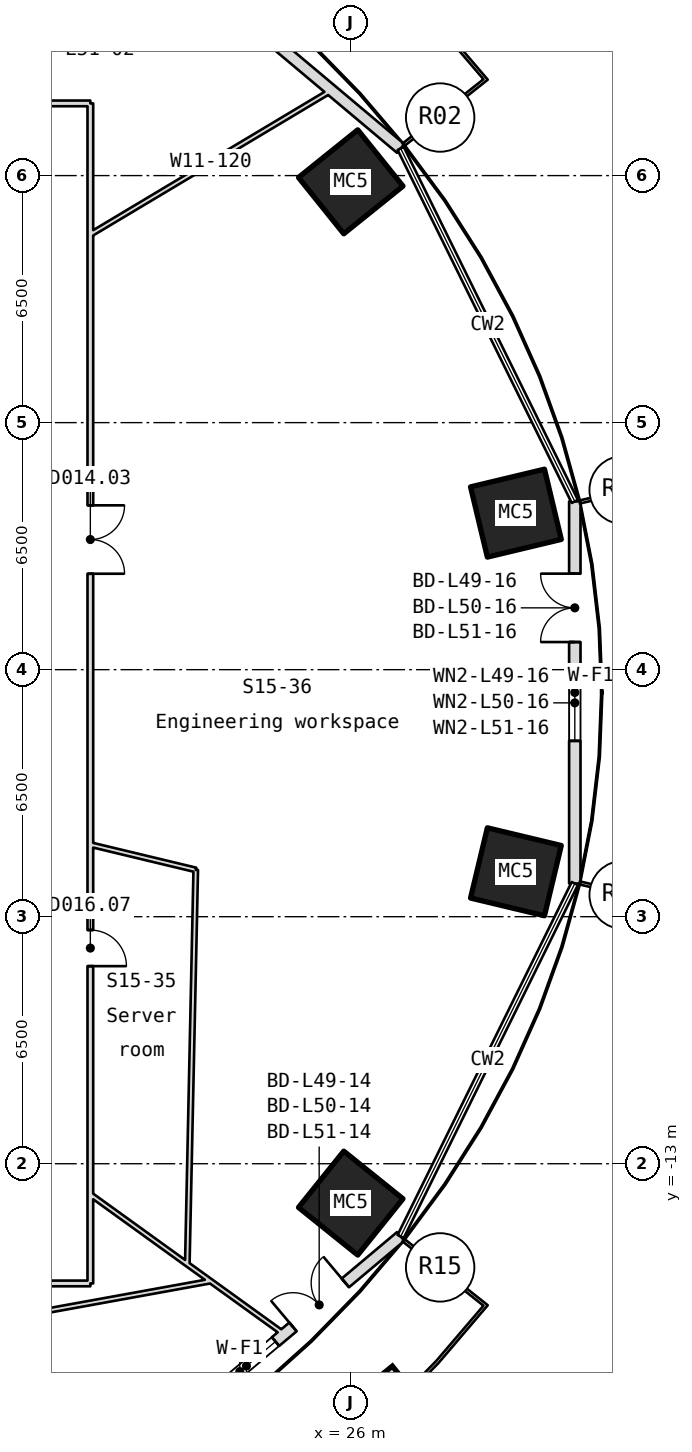
"""IFC4 building model, lengths in metres.
Left out: names, types, materials, properties, quantities, classifications, styles, units other than length and angle.
Written with IfcOpenShell. Run it as: python <this file> out.ifc"""

import sys

from ifc_helpers import new_model, si_unit, direction, frame, frame_2d, origin, origin_2d, place, context, subcontext, project, spatial, rectangle, hollow_rectangle, extrude, element, fill, save


model = new_model("IFC4")
c1 = context("Model", 3, precision=1e-05, world=origin(), true_north=direction((0.0, 1.0)))
c2 = subcontext(c1, "Body", "Model", "MODEL_VIEW")
j1 = project(units=[si_unit("LENGTHUNIT", "METRE"), si_unit("PLANEANGLEUNIT", "RADIAN")], contexts=[c1])
p1 = place(None, origin())
s1 = spatial("IfcSite", under=j1, at=p1, CompositionType="ELEMENT")
p2 = place(p1, origin())
s2 = spatial("IfcBuilding", under=s1, at=p2, CompositionType="ELEMENT")
p3 = place(p2, frame((0.0, 0.0, 223.3)))
s3 = spatial("IfcBuildingStorey", under=s2, at=p3, CompositionType="ELEMENT", Elevation=223.3)
for number, where, z_axis, x_axis in (
    (1, (30.349, 4.118, -0.18), (0.0, 0.0, 1.0), (0.233, -0.973, 0.0)),
    (2, (26.002, 12.836, -0.18), (0.0, 0.0, 1.0), (0.627, -0.779, 0.0)),
    (3, (26.002, -14.037, -0.18), (0.0, 0.0, 1.0), (-0.627, -0.779, 0.0)),
    (4, (30.349, -5.318, -0.18), (0.0, 0.0, 1.0), (-0.233, -0.973, 0.0)),
):
    element("IfcColumn", number, at=place(p3, frame(where, z_axis=z_axis, x_axis=x_axis)), inside=s3, PredefinedType="COLUMN", context=c2, shape_type="SweptSolid", body=[
        extrude(hollow_rectangle(XDim=1.9, YDim=2.0, WallThickness=0.07, at=origin_2d()), origin(), (0.0, 0.0, 1.0), 4.15),
    ])
p4 = place(p3, frame((27.316, 13.714, 0.0), z_axis=(0.0, 0.0, 1.0), x_axis=(-0.765870158107, 0.642995257308, 0.0)))
e5 = element("IfcWall", 5, at=p4, inside=s3, PredefinedType="SOLIDWALL", context=c2, shape_type="SweptSolid", body=[
    extrude(rectangle(XDim=11.055, YDim=0.3, at=frame_2d((5.528, 0.0))), origin(), (0.0, 0.0, 1.0), 3.97),
])
p5 = place(p4, frame((7.355, 0.0, 0.0)))
e6 = element("IfcOpeningElement", 6, at=p5, cuts=e5, PredefinedType="OPENING", context=c2, shape_type="SweptSolid", body=[
    extrude(rectangle(XDim=1.8, YDim=2.4, at=frame_2d((0.9, 1.2))), frame((0.0, 0.16, 0.0), z_axis=(0.0, -1.0, 0.0), x_axis=(1.0, 0.0, 0.0)), (0.0, 0.0, 1.0), 0.32),
])
p6 = place(p4, frame((4.755, 0.0, 0.9)))
e7 = element("IfcOpeningElement", 7, at=p6, cuts=e5, PredefinedType="OPENING", context=c2, shape_type="SweptSolid", body=[
    extrude(rectangle(XDim=2.0, YDim=1.5, at=frame_2d((1.0, 0.75))), frame((0.0, 0.16, 0.0), z_axis=(0.0, -1.0, 0.0), x_axis=(1.0, 0.0, 0.0)), (0.0, 0.0, 1.0), 0.32),
])
p7 = place(p3, frame((18.849, -22.023, 0.0), z_axis=(0.0, 0.0, 1.0), x_axis=(0.765870158107, 0.642995257308, 0.0)))
e8 = element("IfcWall", 8, at=p7, inside=s3, PredefinedType="SOLIDWALL", context=c2, shape_type="SweptSolid", body=[
    extrude(rectangle(XDim=11.055, YDim=0.3, at=frame_2d((5.528, 0.0))), origin(), (0.0, 0.0, 1.0), 3.97),
])
p8 = place(p7, frame((7.355, 0.0, 0.0)))
e9 = element("IfcOpeningElement", 9, at=p8, cuts=e8, PredefinedType="OPENING", context=c2, shape_type="SweptSolid", body=[
    extrude(rectangle(XDim=1.8, YDim=2.4, at=frame_2d((0.9, 1.2))), frame((0.0, 0.16, 0.0), z_axis=(0.0, -1.0, 0.0), x_axis=(1.0, 0.0, 0.0)), (0.0, 0.0, 1.0), 0.32),
])
p9 = place(p7, frame((4.755, 0.0, 0.9)))
e10 = element("IfcOpeningElement", 10, at=p9, cuts=e8, PredefinedType="OPENING", context=c2, shape_type="SweptSolid", body=[
    extrude(rectangle(XDim=2.0, YDim=1.5, at=frame_2d((1.0, 0.75))), frame((0.0, 0.16, 0.0), z_axis=(0.0, -1.0, 0.0), x_axis=(1.0, 0.0, 0.0)), (0.0, 0.0, 1.0), 0.32),
])
p10 = place(p3, frame((31.898, -5.626, 0.0), z_axis=(0.0, 0.0, 1.0), x_axis=(0.0, 1.0, 0.0)))
e11 = element("IfcWall", 11, at=p10, inside=s3, PredefinedType="SOLIDWALL", context=c2, shape_type="SweptSolid", body=[
    extrude(rectangle(XDim=10.053, YDim=0.3, at=frame_2d((5.026, 0.0))), origin(), (0.0, 0.0, 1.0), 3.97),
])
p11 = place(p10, frame((6.353, 0.0, 0.0)))
e12 = element("IfcOpeningElement", 12, at=p11, cuts=e11, PredefinedType="OPENING", context=c2, shape_type="SweptSolid", body=[
    extrude(rectangle(XDim=1.8, YDim=2.4, at=frame_2d((0.9, 1.2))), frame((0.0, 0.16, 0.0), z_axis=(0.0, -1.0, 0.0), x_axis=(1.0, 0.0, 0.0)), (0.0, 0.0, 1.0), 0.32),
])
p12 = place(p10, frame((3.753, 0.0, 0.9)))
e13 = element("IfcOpeningElement", 13, at=p12, cuts=e11, PredefinedType="OPENING", context=c2, shape_type="SweptSolid", body=[
    extrude(rectangle(XDim=2.0, YDim=1.5, at=frame_2d((1.0, 0.75))), frame((0.0, 0.16, 0.0), z_axis=(0.0, -1.0, 0.0), x_axis=(1.0, 0.0, 0.0)), (0.0, 0.0, 1.0), 0.32),
])
p13 = place(p3, frame((8.066, -18.673, 0.0), z_axis=(0.0, 0.0, 1.0), x_axis=(0.983945089575, 0.178471456263, 0.0)))
e14 = element("IfcWall", 14, at=p13, inside=s3, PredefinedType="PARTITIONING", context=c2, shape_type="SweptSolid", body=[
    extrude(rectangle(XDim=14.48, YDim=0.12, at=frame_2d((7.24, 0.0))), origin(), (0.0, 0.0, 1.0), 3.97),
])
p14 = place(p3, frame((16.45, 14.9, 0.0), z_axis=(0.0, 0.0, 1.0), x_axis=(1.0, 0.0, 0.0)))
e15 = element("IfcWall", 15, at=p14, inside=s3, PredefinedType="PARTITIONING", context=c2, shape_type="SweptSolid", body=[
    extrude(rectangle(XDim=2.7, YDim=0.15, at=frame_2d((1.35, 0.0))), origin(), (0.0, 0.0, 1.0), 3.97),
])
p15 = place(p3, frame((19.15, -16.15, 0.0), z_axis=(0.0, 0.0, 1.0), x_axis=(-1.0, 0.0, 0.0)))
e16 = element("IfcWall", 16, at=p15, inside=s3, PredefinedType="PARTITIONING", context=c2, shape_type="SweptSolid", body=[
    extrude(rectangle(XDim=38.3, YDim=0.15, at=frame_2d((19.15, 0.0))), origin(), (0.0, 0.0, 1.0), 3.97),
])
p16 = place(p15, frame((5.611, 0.0, 0.0)))
e17 = element("IfcOpeningElement", 17, at=p16, cuts=e16, PredefinedType="OPENING", context=c2, shape_type="SweptSolid", body=[
    extrude(rectangle(XDim=0.95, YDim=2.1, at=frame_2d((0.475, 1.05))), frame((0.0, 0.085, 0.0), z_axis=(0.0, -1.0, 0.0), x_axis=(1.0, 0.0, 0.0)), (0.0, 0.0, 1.0), 0.17),
])
p17 = place(p15, frame((30.414, 0.0, 0.0)))
e18 = element("IfcOpeningElement", 18, at=p17, cuts=e16, PredefinedType="OPENING", context=c2, shape_type="SweptSolid", body=[
    extrude(rectangle(XDim=1.8, YDim=2.1, at=frame_2d((0.9, 1.05))), frame((0.0, 0.085, 0.0), z_axis=(0.0, -1.0, 0.0), x_axis=(1.0, 0.0, 0.0)), (0.0, 0.0, 1.0), 0.17),
])
p18 = place(p3, frame((19.15, -13.807, 0.0), z_axis=(0.0, 0.0, 1.0), x_axis=(0.811160965087, -0.584822955021, 0.0)))
e19 = element("IfcWall", 19, at=p18, inside=s3, PredefinedType="PARTITIONING", context=c2, shape_type="SweptSolid", body=[
    extrude(rectangle(XDim=6.291, YDim=0.12, at=frame_2d((3.146, 0.0))), origin(), (0.0, 0.0, 1.0), 3.97),
])
p19 = place(p3, frame((19.15, 11.449, 0.0), z_axis=(0.0, 0.0, 1.0), x_axis=(0.858293202809, 0.513159602864, 0.0)))
e20 = element("IfcWall", 20, at=p19, inside=s3, PredefinedType="PARTITIONING", context=c2, shape_type="SweptSolid", body=[
    extrude(rectangle(XDim=7.393, YDim=0.12, at=frame_2d((3.696, 0.0))), origin(), (0.0, 0.0, 1.0), 3.97),
])
p20 = place(p3, frame((19.15, 14.9, 0.0), z_axis=(0.0, 0.0, 1.0), x_axis=(0.0, -1.0, 0.0)))
e21 = element("IfcWall", 21, at=p20, inside=s3, PredefinedType="PARTITIONING", context=c2, shape_type="SweptSolid", body=[
    extrude(rectangle(XDim=31.05, YDim=0.15, at=frame_2d((15.525, 0.0))), origin(), (0.0, 0.0, 1.0), 3.97),
])
p21 = place(p20, frame((21.751, 0.0, 0.0)))
e22 = element("IfcOpeningElement", 22, at=p21, cuts=e21, PredefinedType="OPENING", context=c2, shape_type="SweptSolid", body=[
    extrude(rectangle(XDim=0.95, YDim=2.1, at=frame_2d((0.475, 1.05))), frame((0.0, 0.085, 0.0), z_axis=(0.0, -1.0, 0.0), x_axis=(1.0, 0.0, 0.0)), (0.0, 0.0, 1.0), 0.17),
])
p22 = place(p20, frame((10.576, 0.0, 0.0)))
e23 = element("IfcOpeningElement", 23, at=p22, cuts=e21, PredefinedType="OPENING", context=c2, shape_type="SweptSolid", body=[
    extrude(rectangle(XDim=1.8, YDim=2.1, at=frame_2d((0.9, 1.05))), frame((0.0, 0.085, 0.0), z_axis=(0.0, -1.0, 0.0), x_axis=(1.0, 0.0, 0.0)), (0.0, 0.0, 1.0), 0.17),
])
p23 = place(p3, frame((21.701, -15.647, 0.0), z_axis=(0.0, 0.0, 1.0), x_axis=(0.021402327954, 0.999770943946, 0.0)))
e24 = element("IfcWall", 24, at=p23, inside=s3, PredefinedType="PARTITIONING", context=c2, shape_type="SweptSolid", body=[
    extrude(rectangle(XDim=10.381, YDim=0.12, at=frame_2d((5.19, 0.0))), origin(), (0.0, 0.0, 1.0), 3.97),
])
p24 = place(p3, frame((21.924, -5.269, 0.0), z_axis=(0.0, 0.0, 1.0), x_axis=(-0.972322007638, 0.233644844719, 0.0)))
e25 = element("IfcWall", 25, at=p24, inside=s3, PredefinedType="PARTITIONING", context=c2, shape_type="SweptSolid", body=[
    extrude(rectangle(XDim=2.853, YDim=0.12, at=frame_2d((1.426, 0.0))), origin(), (0.0, 0.0, 1.0), 3.97),
])
p25 = place(p8, origin())
e26 = element("IfcDoor", 26, at=p25, inside=s3, OperationType="SINGLE_SWING_LEFT", PredefinedType="DOOR", context=c2, shape_type="SweptSolid", body=[
    extrude(rectangle(XDim=1.8, YDim=2.4, at=frame_2d((0.9, 1.2))), frame((0.0, 0.025, 0.0), z_axis=(0.0, -1.0, 0.0), x_axis=(1.0, 0.0, 0.0)), (0.0, 0.0, 1.0), 0.05),
])
fill(e9, e26)
p26 = place(p9, origin())
e27 = element("IfcWindow", 27, at=p26, inside=s3, PartitioningType="SINGLE_PANEL", PredefinedType="WINDOW", context=c2, shape_type="SweptSolid", body=[
    extrude(rectangle(XDim=2.0, YDim=1.5, at=frame_2d((1.0, 0.75))), frame((0.0, 0.03, 0.0), z_axis=(0.0, -1.0, 0.0), x_axis=(1.0, 0.0, 0.0)), (0.0, 0.0, 1.0), 0.06),
])
fill(e10, e27)
p27 = place(p11, origin())
e28 = element("IfcDoor", 28, at=p27, inside=s3, OperationType="SINGLE_SWING_LEFT", PredefinedType="DOOR", context=c2, shape_type="SweptSolid", body=[
    extrude(rectangle(XDim=1.8, YDim=2.4, at=frame_2d((0.9, 1.2))), frame((0.0, 0.025, 0.0), z_axis=(0.0, -1.0, 0.0), x_axis=(1.0, 0.0, 0.0)), (0.0, 0.0, 1.0), 0.05),
])
fill(e12, e28)
p28 = place(p12, origin())
e29 = element("IfcWindow", 29, at=p28, inside=s3, PartitioningType="SINGLE_PANEL", PredefinedType="WINDOW", context=c2, shape_type="SweptSolid", body=[
    extrude(rectangle(XDim=2.0, YDim=1.5, at=frame_2d((1.0, 0.75))), frame((0.0, 0.03, 0.0), z_axis=(0.0, -1.0, 0.0), x_axis=(1.0, 0.0, 0.0)), (0.0, 0.0, 1.0), 0.06),
])
fill(e13, e29)
p29 = place(p21, origin())
e30 = element("IfcDoor", 30, at=p29, inside=s3, OperationType="SINGLE_SWING_RIGHT", PredefinedType="DOOR", context=c2, shape_type="SweptSolid", body=[
    extrude(rectangle(XDim=0.95, YDim=2.1, at=frame_2d((0.475, 1.05))), frame((0.0, 0.025, 0.0), z_axis=(0.0, -1.0, 0.0), x_axis=(1.0, 0.0, 0.0)), (0.0, 0.0, 1.0), 0.05),
])
fill(e22, e30)
p30 = place(p22, origin())
e31 = element("IfcDoor", 31, at=p30, inside=s3, OperationType="DOUBLE_DOOR_SINGLE_SWING", PredefinedType="DOOR", context=c2, shape_type="SweptSolid", body=[
    extrude(rectangle(XDim=1.8, YDim=2.1, at=frame_2d((0.9, 1.05))), frame((0.0, 0.025, 0.0), z_axis=(0.0, -1.0, 0.0), x_axis=(1.0, 0.0, 0.0)), (0.0, 0.0, 1.0), 0.05),
])
fill(e23, e31)
save(model, sys.argv[1])
